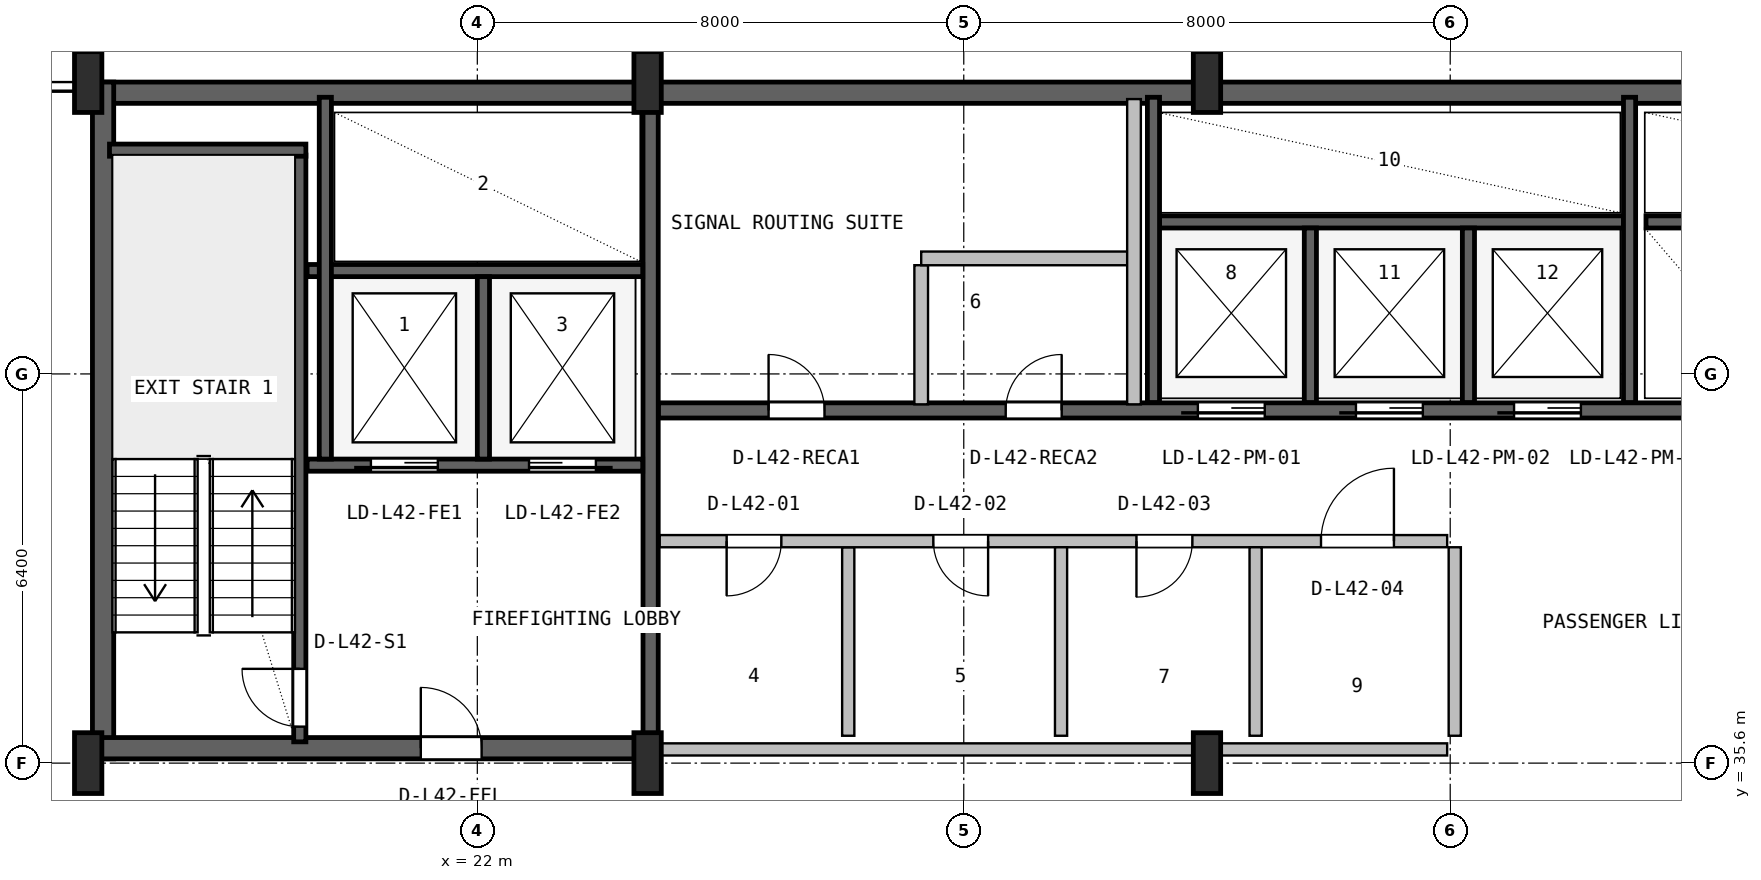
"""IFC4 building model, lengths in metres.
Left out: names, types, materials, properties, quantities, classifications, styles, units other than length and angle.
Written with IfcOpenShell. Run it as: python <this file> out.ifc"""

import sys

from ifc_helpers import new_model, si_unit, direction, frame, frame_2d, origin, origin_2d, place, context, subcontext, project, spatial, rectangle, i_section, extrude, source, transform, mapped, element, fill, save


model = new_model("IFC4")
c1 = context("Model", 3, precision=1e-05, world=origin(), true_north=direction((0.0, 1.0)))
c2 = subcontext(c1, "Body", "Model", "MODEL_VIEW")
j1 = project(units=[si_unit("LENGTHUNIT", "METRE"), si_unit("PLANEANGLEUNIT", "RADIAN")], contexts=[c1])
p1 = place(None, origin())
s1 = spatial("IfcSite", under=j1, at=p1, CompositionType="ELEMENT")
p2 = place(p1, origin())
s2 = spatial("IfcBuilding", under=s1, at=p2, CompositionType="ELEMENT")
p3 = place(p2, frame((0.0, 0.0, 172.4)))
s3 = spatial("IfcBuildingStorey", under=s2, at=p3, CompositionType="ELEMENT", Elevation=172.4)
p4 = place(p3, frame((15.6, 46.625, 0.0), z_axis=(0.0, 0.0, 1.0), x_axis=(1.0, 0.0, 0.0)))
e1 = element("IfcWall", 1, at=p4, inside=s3, PredefinedType="SHEAR", context=c2, shape_type="SweptSolid", body=[
    extrude(rectangle(XDim=36.8, YDim=0.35, at=frame_2d((18.4, 0.0))), origin(), (0.0, 0.0, 1.0), 3.55),
])
p5 = place(p3, frame((15.845, 35.67, 0.0), z_axis=(0.0, 0.0, 1.0), x_axis=(0.0, 1.0, 0.0)))
e2 = element("IfcWall", 2, at=p5, inside=s3, PredefinedType="SHEAR", context=c2, shape_type="SweptSolid", body=[
    extrude(rectangle(XDim=11.13, YDim=0.35, at=frame_2d((5.565, 0.0))), origin(), (0.0, 0.0, 1.0), 3.55),
])
p6 = place(p3, frame((15.67, 35.845, 0.0), z_axis=(0.0, 0.0, 1.0), x_axis=(1.0, 0.0, 0.0)))
e3 = element("IfcWall", 3, at=p6, inside=s3, PredefinedType="SHEAR", context=c2, shape_type="SweptSolid", body=[
    extrude(rectangle(XDim=9.13, YDim=0.35, at=frame_2d((4.565, 0.0))), origin(), (0.0, 0.0, 1.0), 3.55),
])
p7 = place(p6, frame((5.4, 0.0, 0.0)))
e4 = element("IfcOpeningElement", 4, at=p7, cuts=e3, PredefinedType="OPENING", context=c2, shape_type="SweptSolid", body=[
    extrude(rectangle(XDim=1.0, YDim=2.1, at=frame_2d((0.5, 1.05))), frame((0.0, 0.185, 0.0), z_axis=(0.0, -1.0, 0.0), x_axis=(1.0, 0.0, 0.0)), (0.0, 0.0, 1.0), 0.37),
])
m1 = source(origin(), c2, "Body", "SweptSolid", [
    extrude(i_section(OverallWidth=0.45, OverallDepth=1.0, WebThickness=0.016, FlangeThickness=0.03, FilletRadius=0.016, at=origin_2d()), origin(), (0.0, 0.0, 1.0), 3.8),
])
for number, where, z_axis, x_axis in (
    (5, (15.6, 35.6, 0.0), (0.0, 0.0, 1.0), (1.0, 0.0, 0.0)),
    (6, (15.6, 46.8, 0.0), (0.0, 0.0, 1.0), (1.0, 0.0, 0.0)),
    (7, (24.8, 35.6, 0.0), (0.0, 0.0, 1.0), (1.0, 0.0, 0.0)),
    (8, (24.8, 46.8, 0.0), (0.0, 0.0, 1.0), (1.0, 0.0, 0.0)),
    (9, (34.0, 35.6, 0.0), (0.0, 0.0, 1.0), (1.0, 0.0, 0.0)),
    (10, (34.0, 46.8, 0.0), (0.0, 0.0, 1.0), (1.0, 0.0, 0.0)),
):
    element("IfcColumn", number, at=place(p3, frame(where, z_axis=z_axis, x_axis=x_axis)), inside=s3, PredefinedType="COLUMN", context=c2, shape_type="MappedRepresentation", body=[
        mapped(m1, transform((0.0, 0.0, 0.0), x_axis=(1.0, 0.0, 0.0), y_axis=(0.0, 1.0, 0.0), z_axis=(0.0, 0.0, 1.0), scale=1.0)),
    ])
p8 = place(p3, frame((19.08, 35.95, 0.0), z_axis=(0.0, 0.0, 1.0), x_axis=(0.0, 1.0, 0.0)))
e11 = element("IfcWall", 11, at=p8, inside=s3, PredefinedType="SHEAR", context=c2, shape_type="SweptSolid", body=[
    extrude(rectangle(XDim=9.65, YDim=0.2, at=frame_2d((4.825, 0.0))), origin(), (0.0, 0.0, 1.0), 3.55),
])
p9 = place(p8, frame((0.25, 0.0, 0.0)))
e12 = element("IfcOpeningElement", 12, at=p9, cuts=e11, PredefinedType="OPENING", context=c2, shape_type="SweptSolid", body=[
    extrude(rectangle(XDim=0.95, YDim=2.1, at=frame_2d((0.475, 1.05))), frame((0.0, 0.11, 0.0), z_axis=(0.0, -1.0, 0.0), x_axis=(1.0, 0.0, 0.0)), (0.0, 0.0, 1.0), 0.22),
])
p10 = place(p3, frame((15.95, 45.68, 0.0), z_axis=(0.0, 0.0, 1.0), x_axis=(1.0, 0.0, 0.0)))
e13 = element("IfcWall", 13, at=p10, inside=s3, PredefinedType="SHEAR", context=c2, shape_type="SweptSolid", body=[
    extrude(rectangle(XDim=3.23, YDim=0.2, at=frame_2d((1.615, 0.0))), origin(), (0.0, 0.0, 1.0), 3.55),
])
p11 = place(p3, frame((24.85, 36.05, 0.0), z_axis=(0.0, 0.0, 1.0), x_axis=(0.0, 1.0, 0.0)))
e14 = element("IfcWall", 14, at=p11, inside=s3, PredefinedType="SHEAR", context=c2, shape_type="SweptSolid", body=[
    extrude(rectangle(XDim=10.45, YDim=0.25, at=frame_2d((5.225, 0.0))), origin(), (0.0, 0.0, 1.0), 3.55),
])
p12 = place(p3, frame((19.2, 40.5, 0.0), z_axis=(0.0, 0.0, 1.0), x_axis=(1.0, 0.0, 0.0)))
e15 = element("IfcWall", 15, at=p12, inside=s3, PredefinedType="SHEAR", context=c2, shape_type="SweptSolid", body=[
    extrude(rectangle(XDim=5.52, YDim=0.2, at=frame_2d((2.76, 0.0))), origin(), (0.0, 0.0, 1.0), 3.55),
])
p13 = place(p12, frame((1.05, 0.0, 0.0)))
e16 = element("IfcOpeningElement", 16, at=p13, cuts=e15, PredefinedType="OPENING", context=c2, shape_type="SweptSolid", body=[
    extrude(rectangle(XDim=1.1, YDim=2.18, at=frame_2d((0.55, 1.09))), frame((0.0, 0.11, 0.0), z_axis=(0.0, -1.0, 0.0), x_axis=(1.0, 0.0, 0.0)), (0.0, 0.0, 1.0), 0.22),
])
p14 = place(p12, frame((3.65, 0.0, 0.0)))
e17 = element("IfcOpeningElement", 17, at=p14, cuts=e15, PredefinedType="OPENING", context=c2, shape_type="SweptSolid", body=[
    extrude(rectangle(XDim=1.1, YDim=2.18, at=frame_2d((0.55, 1.09))), frame((0.0, 0.11, 0.0), z_axis=(0.0, -1.0, 0.0), x_axis=(1.0, 0.0, 0.0)), (0.0, 0.0, 1.0), 0.22),
])
p15 = place(p3, frame((19.2, 43.7, 0.0), z_axis=(0.0, 0.0, 1.0), x_axis=(1.0, 0.0, 0.0)))
e18 = element("IfcWall", 18, at=p15, inside=s3, PredefinedType="SHEAR", context=c2, shape_type="SweptSolid", body=[
    extrude(rectangle(XDim=5.52, YDim=0.2, at=frame_2d((2.76, 0.0))), origin(), (0.0, 0.0, 1.0), 3.55),
])
p16 = place(p3, frame((22.1, 40.6, 0.0), z_axis=(0.0, 0.0, 1.0), x_axis=(0.0, 1.0, 0.0)))
e19 = element("IfcWall", 19, at=p16, inside=s3, PredefinedType="SHEAR", context=c2, shape_type="SweptSolid", body=[
    extrude(rectangle(XDim=3.0, YDim=0.2, at=frame_2d((1.5, 0.0))), origin(), (0.0, 0.0, 1.0), 3.55),
])
p17 = place(p3, frame((19.5, 40.6, 0.0), z_axis=(0.0, 0.0, 1.0), x_axis=(0.0, 1.0, 0.0)))
e20 = element("IfcWall", 20, at=p17, inside=s3, PredefinedType="SHEAR", context=c2, shape_type="SweptSolid", body=[
    extrude(rectangle(XDim=5.95, YDim=0.2, at=frame_2d((2.975, 0.0))), origin(), (0.0, 0.0, 1.0), 3.55),
])
p18 = place(p3, frame((24.98, 41.4, 0.0), z_axis=(0.0, 0.0, 1.0), x_axis=(1.0, 0.0, 0.0)))
e21 = element("IfcWall", 21, at=p18, inside=s3, PredefinedType="SHEAR", context=c2, shape_type="SweptSolid", body=[
    extrude(rectangle(XDim=23.82, YDim=0.25, at=frame_2d((11.91, 0.0))), origin(), (0.0, 0.0, 1.0), 3.55),
])
p19 = place(p18, frame((8.87, 0.0, 0.0)))
e22 = element("IfcOpeningElement", 22, at=p19, cuts=e21, PredefinedType="OPENING", context=c2, shape_type="SweptSolid", body=[
    extrude(rectangle(XDim=1.1, YDim=2.18, at=frame_2d((0.55, 1.09))), frame((0.0, 0.135, 0.0), z_axis=(0.0, -1.0, 0.0), x_axis=(1.0, 0.0, 0.0)), (0.0, 0.0, 1.0), 0.27),
])
p20 = place(p18, frame((11.47, 0.0, 0.0)))
e23 = element("IfcOpeningElement", 23, at=p20, cuts=e21, PredefinedType="OPENING", context=c2, shape_type="SweptSolid", body=[
    extrude(rectangle(XDim=1.1, YDim=2.18, at=frame_2d((0.55, 1.09))), frame((0.0, 0.135, 0.0), z_axis=(0.0, -1.0, 0.0), x_axis=(1.0, 0.0, 0.0)), (0.0, 0.0, 1.0), 0.27),
])
p21 = place(p18, frame((14.07, 0.0, 0.0)))
e24 = element("IfcOpeningElement", 24, at=p21, cuts=e21, PredefinedType="OPENING", context=c2, shape_type="SweptSolid", body=[
    extrude(rectangle(XDim=1.1, YDim=2.18, at=frame_2d((0.55, 1.09))), frame((0.0, 0.135, 0.0), z_axis=(0.0, -1.0, 0.0), x_axis=(1.0, 0.0, 0.0)), (0.0, 0.0, 1.0), 0.27),
])
p22 = place(p18, frame((1.81, 0.0, 0.0)))
e25 = element("IfcOpeningElement", 25, at=p22, cuts=e21, PredefinedType="OPENING", context=c2, shape_type="SweptSolid", body=[
    extrude(rectangle(XDim=0.92, YDim=2.08, at=frame_2d((0.46, 1.04))), frame((0.0, 0.135, 0.0), z_axis=(0.0, -1.0, 0.0), x_axis=(1.0, 0.0, 0.0)), (0.0, 0.0, 1.0), 0.27),
])
p23 = place(p18, frame((5.71, 0.0, 0.0)))
e26 = element("IfcOpeningElement", 26, at=p23, cuts=e21, PredefinedType="OPENING", context=c2, shape_type="SweptSolid", body=[
    extrude(rectangle(XDim=0.92, YDim=2.08, at=frame_2d((0.46, 1.04))), frame((0.0, 0.135, 0.0), z_axis=(0.0, -1.0, 0.0), x_axis=(1.0, 0.0, 0.0)), (0.0, 0.0, 1.0), 0.27),
])
p24 = place(p3, frame((33.22, 44.5, 0.0), z_axis=(0.0, 0.0, 1.0), x_axis=(1.0, 0.0, 0.0)))
e27 = element("IfcWall", 27, at=p24, inside=s3, PredefinedType="SHEAR", context=c2, shape_type="SweptSolid", body=[
    extrude(rectangle(XDim=7.63, YDim=0.2, at=frame_2d((3.815, 0.0))), origin(), (0.0, 0.0, 1.0), 3.55),
])
p25 = place(p3, frame((33.12, 41.53, 0.0), z_axis=(0.0, 0.0, 1.0), x_axis=(0.0, 1.0, 0.0)))
e28 = element("IfcWall", 28, at=p25, inside=s3, PredefinedType="SHEAR", context=c2, shape_type="SweptSolid", body=[
    extrude(rectangle(XDim=5.02, YDim=0.2, at=frame_2d((2.51, 0.0))), origin(), (0.0, 0.0, 1.0), 3.55),
])
for number, where, z_axis, x_axis in (
    (29, (35.7, 41.53, 0.0), (0.0, 0.0, 1.0), (0.0, 1.0, 0.0)),
    (30, (38.3, 41.53, 0.0), (0.0, 0.0, 1.0), (0.0, 1.0, 0.0)),
):
    element("IfcWall", number, at=place(p3, frame(where, z_axis=z_axis, x_axis=x_axis)), inside=s3, PredefinedType="SHEAR", context=c2, shape_type="SweptSolid", body=[
        extrude(rectangle(XDim=2.87, YDim=0.2, at=frame_2d((1.435, 0.0))), origin(), (0.0, 0.0, 1.0), 3.55),
    ])
p26 = place(p3, frame((40.95, 41.53, 0.0), z_axis=(0.0, 0.0, 1.0), x_axis=(0.0, 1.0, 0.0)))
e31 = element("IfcWall", 31, at=p26, inside=s3, PredefinedType="SHEAR", context=c2, shape_type="SweptSolid", body=[
    extrude(rectangle(XDim=5.02, YDim=0.2, at=frame_2d((2.51, 0.0))), origin(), (0.0, 0.0, 1.0), 3.55),
])
p27 = place(p3, frame((41.22, 44.5, 0.0), z_axis=(0.0, 0.0, 1.0), x_axis=(1.0, 0.0, 0.0)))
e32 = element("IfcWall", 32, at=p27, inside=s3, PredefinedType="SHEAR", context=c2, shape_type="SweptSolid", body=[
    extrude(rectangle(XDim=7.58, YDim=0.2, at=frame_2d((3.79, 0.0))), origin(), (0.0, 0.0, 1.0), 3.55),
])
p28 = place(p3, frame((25.0, 35.825, 0.0), z_axis=(0.0, 0.0, 1.0), x_axis=(1.0, 0.0, 0.0)))
e33 = element("IfcWall", 33, at=p28, inside=s3, PredefinedType="SOLIDWALL", context=c2, shape_type="SweptSolid", body=[
    extrude(rectangle(XDim=12.95, YDim=0.2, at=frame_2d((6.475, 0.0))), origin(), (0.0, 0.0, 1.0), 2.575),
])
p29 = place(p3, frame((28.1, 36.05, 0.0), z_axis=(0.0, 0.0, 1.0), x_axis=(0.0, 1.0, 0.0)))
e34 = element("IfcWall", 34, at=p29, inside=s3, PredefinedType="PLUMBINGWALL", context=c2, shape_type="SweptSolid", body=[
    extrude(rectangle(XDim=3.1, YDim=0.2, at=frame_2d((1.55, 0.0))), origin(), (0.0, 0.0, 1.0), 3.53),
])
p30 = place(p3, frame((25.0, 39.25, 0.0), z_axis=(0.0, 0.0, 1.0), x_axis=(1.0, 0.0, 0.0)))
e35 = element("IfcWall", 35, at=p30, inside=s3, PredefinedType="SOLIDWALL", context=c2, shape_type="SweptSolid", body=[
    extrude(rectangle(XDim=12.95, YDim=0.2, at=frame_2d((6.475, 0.0))), origin(), (0.0, 0.0, 1.0), 3.53),
])
p31 = place(p30, frame((1.1, 0.0, 0.0)))
e36 = element("IfcOpeningElement", 36, at=p31, cuts=e35, PredefinedType="OPENING", context=c2, shape_type="SweptSolid", body=[
    extrude(rectangle(XDim=0.9, YDim=2.06, at=frame_2d((0.45, 1.03))), frame((0.0, 0.11, 0.0), z_axis=(0.0, -1.0, 0.0), x_axis=(1.0, 0.0, 0.0)), (0.0, 0.0, 1.0), 0.22),
])
p32 = place(p30, frame((4.5, 0.0, 0.0)))
e37 = element("IfcOpeningElement", 37, at=p32, cuts=e35, PredefinedType="OPENING", context=c2, shape_type="SweptSolid", body=[
    extrude(rectangle(XDim=0.9, YDim=2.06, at=frame_2d((0.45, 1.03))), frame((0.0, 0.11, 0.0), z_axis=(0.0, -1.0, 0.0), x_axis=(1.0, 0.0, 0.0)), (0.0, 0.0, 1.0), 0.22),
])
p33 = place(p30, frame((7.84, 0.0, 0.0)))
e38 = element("IfcOpeningElement", 38, at=p33, cuts=e35, PredefinedType="OPENING", context=c2, shape_type="SweptSolid", body=[
    extrude(rectangle(XDim=0.92, YDim=2.08, at=frame_2d((0.46, 1.04))), frame((0.0, 0.11, 0.0), z_axis=(0.0, -1.0, 0.0), x_axis=(1.0, 0.0, 0.0)), (0.0, 0.0, 1.0), 0.22),
])
p34 = place(p30, frame((10.875, 0.0, 0.0)))
e39 = element("IfcOpeningElement", 39, at=p34, cuts=e35, PredefinedType="OPENING", context=c2, shape_type="SweptSolid", body=[
    extrude(rectangle(XDim=1.2, YDim=2.1, at=frame_2d((0.6, 1.05))), frame((0.0, 0.11, 0.0), z_axis=(0.0, -1.0, 0.0), x_axis=(1.0, 0.0, 0.0)), (0.0, 0.0, 1.0), 0.22),
])
p35 = place(p3, frame((31.6, 36.05, 0.0), z_axis=(0.0, 0.0, 1.0), x_axis=(0.0, 1.0, 0.0)))
e40 = element("IfcWall", 40, at=p35, inside=s3, PredefinedType="PLUMBINGWALL", context=c2, shape_type="SweptSolid", body=[
    extrude(rectangle(XDim=3.1, YDim=0.2, at=frame_2d((1.55, 0.0))), origin(), (0.0, 0.0, 1.0), 3.53),
])
for number, where, z_axis, x_axis in (
    (41, (34.8, 36.05, 0.0), (0.0, 0.0, 1.0), (0.0, 1.0, 0.0)),
    (42, (38.075, 36.05, 0.0), (0.0, 0.0, 1.0), (0.0, 1.0, 0.0)),
):
    element("IfcWall", number, at=place(p3, frame(where, z_axis=z_axis, x_axis=x_axis)), inside=s3, PredefinedType="SOLIDWALL", context=c2, shape_type="SweptSolid", body=[
        extrude(rectangle(XDim=3.1, YDim=0.2, at=frame_2d((1.55, 0.0))), origin(), (0.0, 0.0, 1.0), 3.53),
    ])
p36 = place(p3, frame((29.3, 41.5, 0.0), z_axis=(0.0, 0.0, 1.0), x_axis=(0.0, 1.0, 0.0)))
e43 = element("IfcWall", 43, at=p36, inside=s3, PredefinedType="PARTITIONING", context=c2, shape_type="SweptSolid", body=[
    extrude(rectangle(XDim=2.288, YDim=0.225, at=frame_2d((1.144, 0.0))), origin(), (0.0, 0.0, 1.0), 3.53),
])
p37 = place(p3, frame((29.3, 43.9, 0.0), z_axis=(0.0, 0.0, 1.0), x_axis=(1.0, 0.0, 0.0)))
e44 = element("IfcWall", 44, at=p37, inside=s3, PredefinedType="PARTITIONING", context=c2, shape_type="SweptSolid", body=[
    extrude(rectangle(XDim=3.5, YDim=0.225, at=frame_2d((1.75, 0.0))), origin(), (0.0, 0.0, 1.0), 3.53),
])
p38 = place(p3, frame((32.8, 41.5, 0.0), z_axis=(0.0, 0.0, 1.0), x_axis=(0.0, 1.0, 0.0)))
e45 = element("IfcWall", 45, at=p38, inside=s3, PredefinedType="PARTITIONING", context=c2, shape_type="SweptSolid", body=[
    extrude(rectangle(XDim=5.02, YDim=0.225, at=frame_2d((2.51, 0.0))), origin(), (0.0, 0.0, 1.0), 3.53),
])
m2 = source(origin(), c2, "Body", "SweptSolid", [
    extrude(rectangle(XDim=0.95, YDim=2.1, at=frame_2d((0.475, 1.05))), frame((0.0, 0.025, 0.0), z_axis=(0.0, -1.0, 0.0), x_axis=(1.0, 0.0, 0.0)), (0.0, 0.0, 1.0), 0.05),
])
p39 = place(p9, origin())
e46 = element("IfcDoor", 46, at=p39, inside=s3, OperationType="SINGLE_SWING_RIGHT", PredefinedType="DOOR", context=c2, shape_type="MappedRepresentation", body=[
    mapped(m2, transform((0.0, 0.0, 0.0), x_axis=(1.0, 0.0, 0.0), y_axis=(0.0, 1.0, 0.0), z_axis=(0.0, 0.0, 1.0), scale=1.0)),
])
fill(e12, e46)
m3 = source(origin(), c2, "Body", "SweptSolid", [
    extrude(rectangle(XDim=1.0, YDim=2.1, at=frame_2d((0.5, 1.05))), frame((0.0, 0.025, 0.0), z_axis=(0.0, -1.0, 0.0), x_axis=(1.0, 0.0, 0.0)), (0.0, 0.0, 1.0), 0.05),
])
p40 = place(p7, origin())
e47 = element("IfcDoor", 47, at=p40, inside=s3, OperationType="SINGLE_SWING_LEFT", PredefinedType="DOOR", context=c2, shape_type="MappedRepresentation", body=[
    mapped(m3, transform((0.0, 0.0, 0.0), x_axis=(1.0, 0.0, 0.0), y_axis=(0.0, 1.0, 0.0), z_axis=(0.0, 0.0, 1.0), scale=1.0)),
])
fill(e4, e47)
m4 = source(origin(), c2, "Body", "SweptSolid", [
    extrude(rectangle(XDim=1.1, YDim=2.18, at=frame_2d((0.55, 1.09))), frame((0.0, 0.025, 0.0), z_axis=(0.0, -1.0, 0.0), x_axis=(1.0, 0.0, 0.0)), (0.0, 0.0, 1.0), 0.05),
])
p41 = place(p13, frame((1.1, 0.0, 0.0), z_axis=(0.0, 0.0, 1.0), x_axis=(-1.0, 0.0, 0.0)))
e48 = element("IfcDoor", 48, at=p41, inside=s3, OperationType="SLIDING_TO_LEFT", PredefinedType="DOOR", context=c2, shape_type="MappedRepresentation", body=[
    mapped(m4, transform((0.0, 0.0, 0.0), x_axis=(1.0, 0.0, 0.0), y_axis=(0.0, 1.0, 0.0), z_axis=(0.0, 0.0, 1.0), scale=1.0)),
])
fill(e16, e48)
p42 = place(p14, frame((1.1, 0.0, 0.0), z_axis=(0.0, 0.0, 1.0), x_axis=(-1.0, 0.0, 0.0)))
e49 = element("IfcDoor", 49, at=p42, inside=s3, OperationType="SLIDING_TO_RIGHT", PredefinedType="DOOR", context=c2, shape_type="MappedRepresentation", body=[
    mapped(m4, transform((0.0, 0.0, 0.0), x_axis=(1.0, 0.0, 0.0), y_axis=(0.0, 1.0, 0.0), z_axis=(0.0, 0.0, 1.0), scale=1.0)),
])
fill(e17, e49)
p43 = place(p19, frame((1.1, 0.0, 0.0), z_axis=(0.0, 0.0, 1.0), x_axis=(-1.0, 0.0, 0.0)))
e50 = element("IfcDoor", 50, at=p43, inside=s3, OperationType="SLIDING_TO_LEFT", PredefinedType="DOOR", context=c2, shape_type="MappedRepresentation", body=[
    mapped(m4, transform((0.0, 0.0, 0.0), x_axis=(1.0, 0.0, 0.0), y_axis=(0.0, 1.0, 0.0), z_axis=(0.0, 0.0, 1.0), scale=1.0)),
])
fill(e22, e50)
p44 = place(p20, frame((1.1, 0.0, 0.0), z_axis=(0.0, 0.0, 1.0), x_axis=(-1.0, 0.0, 0.0)))
e51 = element("IfcDoor", 51, at=p44, inside=s3, OperationType="SLIDING_TO_LEFT", PredefinedType="DOOR", context=c2, shape_type="MappedRepresentation", body=[
    mapped(m4, transform((0.0, 0.0, 0.0), x_axis=(1.0, 0.0, 0.0), y_axis=(0.0, 1.0, 0.0), z_axis=(0.0, 0.0, 1.0), scale=1.0)),
])
fill(e23, e51)
p45 = place(p21, frame((1.1, 0.0, 0.0), z_axis=(0.0, 0.0, 1.0), x_axis=(-1.0, 0.0, 0.0)))
e52 = element("IfcDoor", 52, at=p45, inside=s3, OperationType="SLIDING_TO_LEFT", PredefinedType="DOOR", context=c2, shape_type="MappedRepresentation", body=[
    mapped(m4, transform((0.0, 0.0, 0.0), x_axis=(1.0, 0.0, 0.0), y_axis=(0.0, 1.0, 0.0), z_axis=(0.0, 0.0, 1.0), scale=1.0)),
])
fill(e24, e52)
m5 = source(origin(), c2, "Body", "SweptSolid", [
    extrude(rectangle(XDim=0.92, YDim=2.08, at=frame_2d((0.46, 1.04))), frame((0.0, 0.025, 0.0), z_axis=(0.0, -1.0, 0.0), x_axis=(1.0, 0.0, 0.0)), (0.0, 0.0, 1.0), 0.05),
])
p46 = place(p22, origin())
e53 = element("IfcDoor", 53, at=p46, inside=s3, OperationType="SINGLE_SWING_LEFT", PredefinedType="DOOR", context=c2, shape_type="MappedRepresentation", body=[
    mapped(m5, transform((0.0, 0.0, 0.0), x_axis=(1.0, 0.0, 0.0), y_axis=(0.0, 1.0, 0.0), z_axis=(0.0, 0.0, 1.0), scale=1.0)),
])
fill(e25, e53)
p47 = place(p23, origin())
e54 = element("IfcDoor", 54, at=p47, inside=s3, OperationType="SINGLE_SWING_RIGHT", PredefinedType="DOOR", context=c2, shape_type="MappedRepresentation", body=[
    mapped(m5, transform((0.0, 0.0, 0.0), x_axis=(1.0, 0.0, 0.0), y_axis=(0.0, 1.0, 0.0), z_axis=(0.0, 0.0, 1.0), scale=1.0)),
])
fill(e26, e54)
m6 = source(origin(), c2, "Body", "SweptSolid", [
    extrude(rectangle(XDim=0.9, YDim=2.06, at=frame_2d((0.45, 1.03))), frame((0.0, 0.025, 0.0), z_axis=(0.0, -1.0, 0.0), x_axis=(1.0, 0.0, 0.0)), (0.0, 0.0, 1.0), 0.05),
])
p48 = place(p31, frame((0.9, 0.0, 0.0), z_axis=(0.0, 0.0, 1.0), x_axis=(-1.0, 0.0, 0.0)))
e55 = element("IfcDoor", 55, at=p48, inside=s3, OperationType="SINGLE_SWING_LEFT", PredefinedType="DOOR", context=c2, shape_type="MappedRepresentation", body=[
    mapped(m6, transform((0.0, 0.0, 0.0), x_axis=(1.0, 0.0, 0.0), y_axis=(0.0, 1.0, 0.0), z_axis=(0.0, 0.0, 1.0), scale=1.0)),
])
fill(e36, e55)
p49 = place(p32, frame((0.9, 0.0, 0.0), z_axis=(0.0, 0.0, 1.0), x_axis=(-1.0, 0.0, 0.0)))
e56 = element("IfcDoor", 56, at=p49, inside=s3, OperationType="SINGLE_SWING_RIGHT", PredefinedType="DOOR", context=c2, shape_type="MappedRepresentation", body=[
    mapped(m6, transform((0.0, 0.0, 0.0), x_axis=(1.0, 0.0, 0.0), y_axis=(0.0, 1.0, 0.0), z_axis=(0.0, 0.0, 1.0), scale=1.0)),
])
fill(e37, e56)
p50 = place(p33, frame((0.92, 0.0, 0.0), z_axis=(0.0, 0.0, 1.0), x_axis=(-1.0, 0.0, 0.0)))
e57 = element("IfcDoor", 57, at=p50, inside=s3, OperationType="SINGLE_SWING_LEFT", PredefinedType="DOOR", context=c2, shape_type="MappedRepresentation", body=[
    mapped(m5, transform((0.0, 0.0, 0.0), x_axis=(1.0, 0.0, 0.0), y_axis=(0.0, 1.0, 0.0), z_axis=(0.0, 0.0, 1.0), scale=1.0)),
])
fill(e38, e57)
m7 = source(origin(), c2, "Body", "SweptSolid", [
    extrude(rectangle(XDim=1.2, YDim=2.1, at=frame_2d((0.6, 1.05))), frame((0.0, 0.025, 0.0), z_axis=(0.0, -1.0, 0.0), x_axis=(1.0, 0.0, 0.0)), (0.0, 0.0, 1.0), 0.05),
])
p51 = place(p34, origin())
e58 = element("IfcDoor", 58, at=p51, inside=s3, OperationType="SINGLE_SWING_RIGHT", PredefinedType="DOOR", context=c2, shape_type="MappedRepresentation", body=[
    mapped(m7, transform((0.0, 0.0, 0.0), x_axis=(1.0, 0.0, 0.0), y_axis=(0.0, 1.0, 0.0), z_axis=(0.0, 0.0, 1.0), scale=1.0)),
])
fill(e39, e58)
save(model, sys.argv[1])
